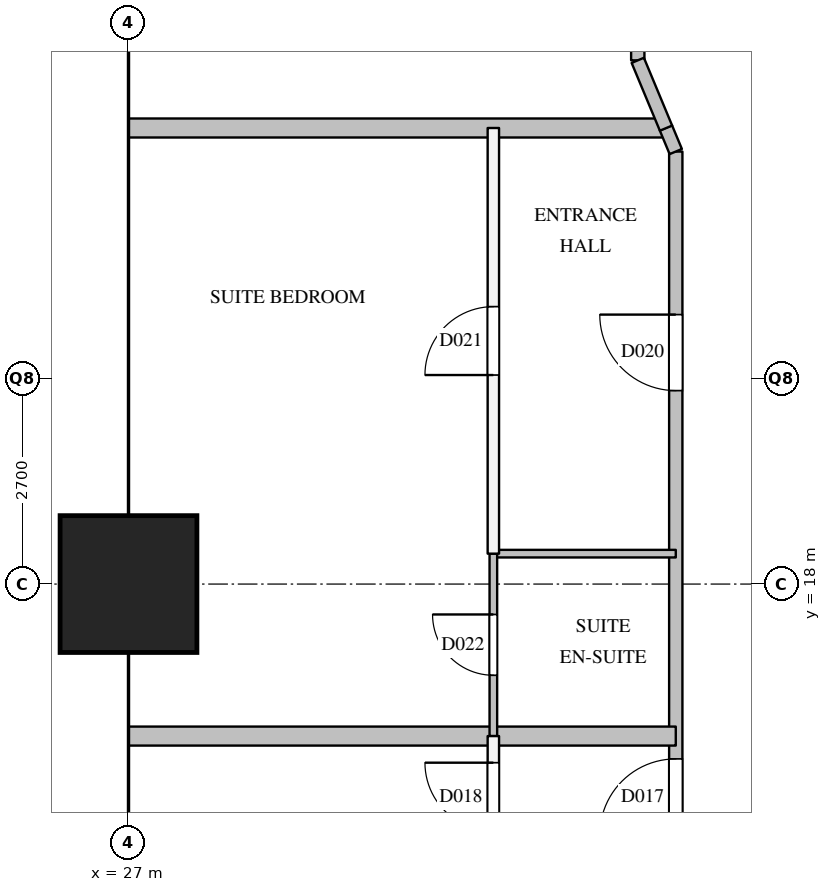
"""IFC4 building model, lengths in metres.
Left out: names, types, materials, properties, quantities, classifications, styles, units other than length and angle.
Written with IfcOpenShell. Run it as: python <this file> out.ifc"""

import sys

from ifc_helpers import new_model, si_unit, direction, frame, frame_2d, origin, origin_2d, place, context, subcontext, project, spatial, rectangle, extrude, element, fill, save


model = new_model("IFC4")
c1 = context("Model", 3, precision=1e-05, world=origin(), true_north=direction((0.0, 1.0)))
c2 = subcontext(c1, "Body", "Model", "MODEL_VIEW")
j1 = project(units=[si_unit("LENGTHUNIT", "METRE"), si_unit("PLANEANGLEUNIT", "RADIAN")], contexts=[c1])
p1 = place(None, origin())
s1 = spatial("IfcSite", under=j1, at=p1, CompositionType="ELEMENT")
p2 = place(p1, origin())
s2 = spatial("IfcBuilding", under=s1, at=p2, CompositionType="ELEMENT")
p3 = place(p2, frame((0.0, 0.0, 81.6)))
s3 = spatial("IfcBuildingStorey", under=s2, at=p3, CompositionType="ELEMENT", Elevation=81.6)
p4 = place(p3, frame((27.0, 18.0, 0.0), z_axis=(0.0, 0.0, 1.0), x_axis=(1.0, 0.0, 0.0)))
e1 = element("IfcColumn", 1, at=p4, inside=s3, PredefinedType="COLUMN", context=c2, shape_type="SweptSolid", body=[
    extrude(rectangle(XDim=1.8, YDim=1.8, at=origin_2d()), origin(), (0.0, 0.0, 1.0), 3.8),
])
p5 = place(p3, frame((33.7, 24.89, 0.0), z_axis=(0.0, 0.0, 1.0), x_axis=(0.0, 1.0, 0.0)))
e2 = element("IfcWall", 2, at=p5, inside=s3, PredefinedType="PARTITIONING", context=c2, shape_type="SweptSolid", body=[
    extrude(rectangle(XDim=3.03, YDim=0.175, at=frame_2d((1.515, 0.0))), origin(), (0.0, 0.0, 1.0), 2.5),
])
p6 = place(p5, frame((1.065, 0.0, 0.0)))
e3 = element("IfcOpeningElement", 3, at=p6, cuts=e2, PredefinedType="OPENING", context=c2, shape_type="SweptSolid", body=[
    extrude(rectangle(XDim=0.9, YDim=2.1, at=frame_2d((0.45, 1.05))), frame((0.0, 0.097, 0.0), z_axis=(0.0, -1.0, 0.0), x_axis=(1.0, 0.0, 0.0)), (0.0, 0.0, 1.0), 0.195),
])
p7 = place(p3, frame((34.2, 7.2, 0.0), z_axis=(0.0, 0.0, 1.0), x_axis=(0.0, 1.0, 0.0)))
e4 = element("IfcWall", 4, at=p7, inside=s3, PredefinedType="PARTITIONING", context=c2, shape_type="SweptSolid", body=[
    extrude(rectangle(XDim=16.49, YDim=0.175, at=frame_2d((8.245, 0.0))), origin(), (0.0, 0.0, 1.0), 3.5),
])
p8 = place(p7, frame((3.5, 0.0, 0.0)))
e5 = element("IfcOpeningElement", 5, at=p8, cuts=e4, PredefinedType="OPENING", context=c2, shape_type="SweptSolid", body=[
    extrude(rectangle(XDim=1.0, YDim=2.1, at=frame_2d((0.5, 1.05))), frame((0.0, 0.097, 0.0), z_axis=(0.0, -1.0, 0.0), x_axis=(1.0, 0.0, 0.0)), (0.0, 0.0, 1.0), 0.195),
])
p9 = place(p7, frame((7.5, 0.0, 0.0)))
e6 = element("IfcOpeningElement", 6, at=p9, cuts=e4, PredefinedType="OPENING", context=c2, shape_type="SweptSolid", body=[
    extrude(rectangle(XDim=1.0, YDim=2.1, at=frame_2d((0.5, 1.05))), frame((0.0, 0.097, 0.0), z_axis=(0.0, -1.0, 0.0), x_axis=(1.0, 0.0, 0.0)), (0.0, 0.0, 1.0), 0.195),
])
p10 = place(p7, frame((13.345, 0.0, 0.0)))
e7 = element("IfcOpeningElement", 7, at=p10, cuts=e4, PredefinedType="OPENING", context=c2, shape_type="SweptSolid", body=[
    extrude(rectangle(XDim=1.0, YDim=2.1, at=frame_2d((0.5, 1.05))), frame((0.0, 0.097, 0.0), z_axis=(0.0, -1.0, 0.0), x_axis=(1.0, 0.0, 0.0)), (0.0, 0.0, 1.0), 0.195),
])
p11 = place(p3, frame((31.8, 14.4, 0.0), z_axis=(0.0, 0.0, 1.0), x_axis=(0.0, 1.0, 0.0)))
e8 = element("IfcWall", 8, at=p11, inside=s3, PredefinedType="PARTITIONING", context=c2, shape_type="SweptSolid", body=[
    extrude(rectangle(XDim=1.6, YDim=0.15, at=frame_2d((0.8, 0.0))), origin(), (0.0, 0.0, 1.0), 3.5),
])
p12 = place(p11, frame((0.35, 0.0, 0.0)))
e9 = element("IfcOpeningElement", 9, at=p12, cuts=e8, PredefinedType="OPENING", context=c2, shape_type="SweptSolid", body=[
    extrude(rectangle(XDim=0.9, YDim=2.1, at=frame_2d((0.45, 1.05))), frame((0.0, 0.085, 0.0), z_axis=(0.0, -1.0, 0.0), x_axis=(1.0, 0.0, 0.0)), (0.0, 0.0, 1.0), 0.17),
])
p13 = place(p3, frame((31.8, 18.4, 0.0), z_axis=(0.0, 0.0, 1.0), x_axis=(0.0, 1.0, 0.0)))
e10 = element("IfcWall", 10, at=p13, inside=s3, PredefinedType="PARTITIONING", context=c2, shape_type="SweptSolid", body=[
    extrude(rectangle(XDim=5.6, YDim=0.15, at=frame_2d((2.8, 0.0))), origin(), (0.0, 0.0, 1.0), 3.5),
])
p14 = place(p13, frame((2.35, 0.0, 0.0)))
e11 = element("IfcOpeningElement", 11, at=p14, cuts=e10, PredefinedType="OPENING", context=c2, shape_type="SweptSolid", body=[
    extrude(rectangle(XDim=0.9, YDim=2.1, at=frame_2d((0.45, 1.05))), frame((0.0, 0.085, 0.0), z_axis=(0.0, -1.0, 0.0), x_axis=(1.0, 0.0, 0.0)), (0.0, 0.0, 1.0), 0.17),
])
p15 = place(p3, frame((27.0, 16.0, 0.0), z_axis=(0.0, 0.0, 1.0), x_axis=(1.0, 0.0, 0.0)))
e12 = element("IfcWall", 12, at=p15, inside=s3, PredefinedType="PARTITIONING", context=c2, shape_type="SweptSolid", body=[
    extrude(rectangle(XDim=7.2, YDim=0.25, at=frame_2d((3.6, 0.0))), origin(), (0.0, 0.0, 1.0), 2.5),
])
p16 = place(p3, frame((27.0, 24.0, 0.0), z_axis=(0.0, 0.0, 1.0), x_axis=(1.0, 0.0, 0.0)))
e13 = element("IfcWall", 13, at=p16, inside=s3, PredefinedType="PARTITIONING", context=c2, shape_type="SweptSolid", body=[
    extrude(rectangle(XDim=7.071, YDim=0.25, at=frame_2d((3.535, 0.0))), origin(), (0.0, 0.0, 1.0), 2.5),
])
p17 = place(p3, frame((31.8, 18.4, 0.0), z_axis=(0.0, 0.0, 1.0), x_axis=(1.0, 0.0, 0.0)))
e14 = element("IfcWall", 14, at=p17, inside=s3, PredefinedType="PARTITIONING", context=c2, shape_type="SweptSolid", body=[
    extrude(rectangle(XDim=2.4, YDim=0.1, at=frame_2d((1.2, 0.0))), origin(), (0.0, 0.0, 1.0), 3.5),
])
p18 = place(p3, frame((31.8, 16.0, 0.0), z_axis=(0.0, 0.0, 1.0), x_axis=(0.0, 1.0, 0.0)))
e15 = element("IfcWall", 15, at=p18, inside=s3, PredefinedType="PARTITIONING", context=c2, shape_type="SweptSolid", body=[
    extrude(rectangle(XDim=2.4, YDim=0.1, at=frame_2d((1.2, 0.0))), origin(), (0.0, 0.0, 1.0), 3.5),
])
p19 = place(p18, frame((0.8, 0.0, 0.0)))
e16 = element("IfcOpeningElement", 16, at=p19, cuts=e15, PredefinedType="OPENING", context=c2, shape_type="SweptSolid", body=[
    extrude(rectangle(XDim=0.8, YDim=2.1, at=frame_2d((0.4, 1.05))), frame((0.0, 0.06, 0.0), z_axis=(0.0, -1.0, 0.0), x_axis=(1.0, 0.0, 0.0)), (0.0, 0.0, 1.0), 0.12),
])
p20 = place(p3, frame((34.2, 23.69, 0.0), z_axis=(0.0, 0.0, 1.0), x_axis=(-0.384307602557, 0.92320510539, 0.0)))
e17 = element("IfcWall", 17, at=p20, inside=s3, PredefinedType="PARTITIONING", context=c2, shape_type="SweptSolid", body=[
    extrude(rectangle(XDim=0.338, YDim=0.175, at=frame_2d((0.169, 0.0))), origin(), (0.0, 0.0, 1.0), 3.5),
])
p21 = place(p3, frame((34.072, 23.998, 0.0), z_axis=(0.0, 0.0, 1.0), x_axis=(-0.384687170746, 0.923047008913, 0.0)))
e18 = element("IfcWall", 18, at=p21, inside=s3, PredefinedType="PARTITIONING", context=c2, shape_type="SweptSolid", body=[
    extrude(rectangle(XDim=0.966, YDim=0.175, at=frame_2d((0.483, 0.0))), origin(), (0.0, 0.0, 1.0), 3.5),
])
p22 = place(p9, origin())
e19 = element("IfcDoor", 19, at=p22, inside=s3, OperationType="SINGLE_SWING_LEFT", PredefinedType="DOOR", context=c2, shape_type="SweptSolid", body=[
    extrude(rectangle(XDim=1.0, YDim=2.1, at=frame_2d((0.5, 1.05))), frame((0.0, 0.025, 0.0), z_axis=(0.0, -1.0, 0.0), x_axis=(1.0, 0.0, 0.0)), (0.0, 0.0, 1.0), 0.05),
])
fill(e6, e19)
p23 = place(p12, origin())
e20 = element("IfcDoor", 20, at=p23, inside=s3, OperationType="SINGLE_SWING_RIGHT", PredefinedType="DOOR", context=c2, shape_type="SweptSolid", body=[
    extrude(rectangle(XDim=0.9, YDim=2.1, at=frame_2d((0.45, 1.05))), frame((0.0, 0.025, 0.0), z_axis=(0.0, -1.0, 0.0), x_axis=(1.0, 0.0, 0.0)), (0.0, 0.0, 1.0), 0.05),
])
fill(e9, e20)
p24 = place(p10, origin())
e21 = element("IfcDoor", 21, at=p24, inside=s3, OperationType="SINGLE_SWING_RIGHT", PredefinedType="DOOR", context=c2, shape_type="SweptSolid", body=[
    extrude(rectangle(XDim=1.0, YDim=2.1, at=frame_2d((0.5, 1.05))), frame((0.0, 0.025, 0.0), z_axis=(0.0, -1.0, 0.0), x_axis=(1.0, 0.0, 0.0)), (0.0, 0.0, 1.0), 0.05),
])
fill(e7, e21)
p25 = place(p14, origin())
e22 = element("IfcDoor", 22, at=p25, inside=s3, OperationType="SINGLE_SWING_LEFT", PredefinedType="DOOR", context=c2, shape_type="SweptSolid", body=[
    extrude(rectangle(XDim=0.9, YDim=2.1, at=frame_2d((0.45, 1.05))), frame((0.0, 0.025, 0.0), z_axis=(0.0, -1.0, 0.0), x_axis=(1.0, 0.0, 0.0)), (0.0, 0.0, 1.0), 0.05),
])
fill(e11, e22)
p26 = place(p19, origin())
e23 = element("IfcDoor", 23, at=p26, inside=s3, OperationType="SINGLE_SWING_RIGHT", PredefinedType="DOOR", context=c2, shape_type="SweptSolid", body=[
    extrude(rectangle(XDim=0.8, YDim=2.1, at=frame_2d((0.4, 1.05))), frame((0.0, 0.025, 0.0), z_axis=(0.0, -1.0, 0.0), x_axis=(1.0, 0.0, 0.0)), (0.0, 0.0, 1.0), 0.05),
])
fill(e16, e23)
save(model, sys.argv[1])
